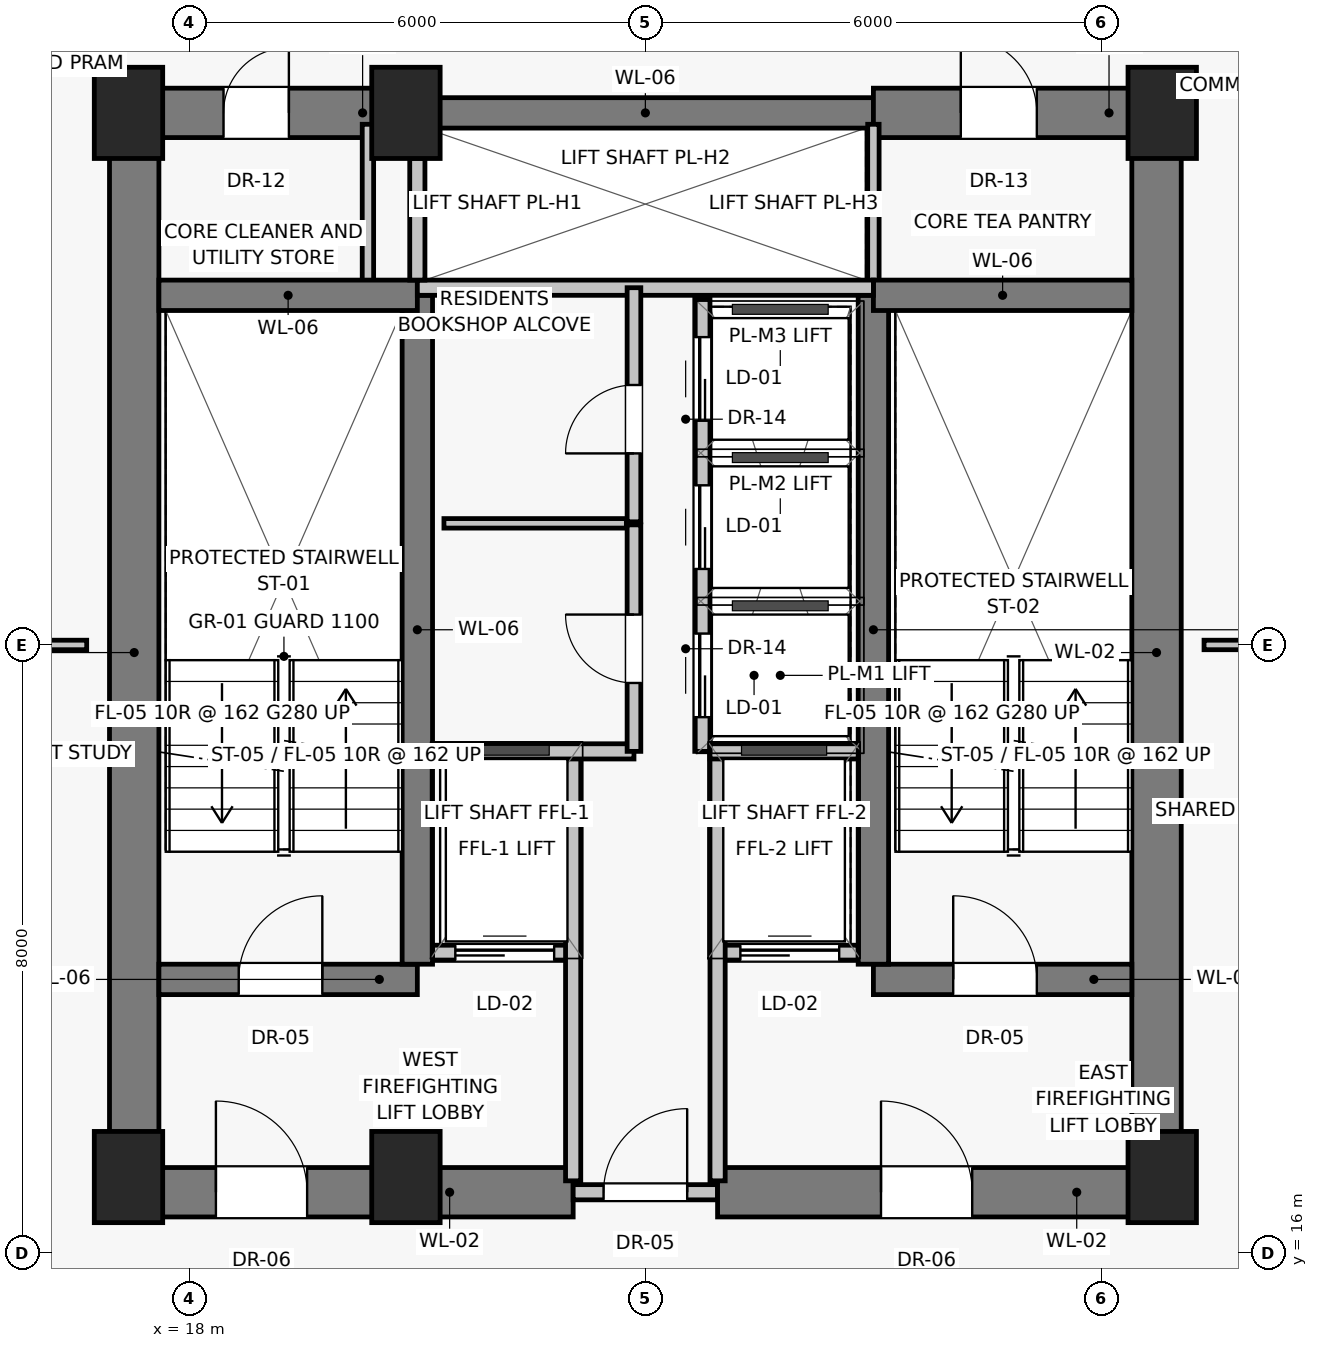
"""IFC4 building model, lengths in metres.
Left out: names, types, materials, properties, quantities, classifications, styles, units other than length and angle.
Written with IfcOpenShell. Run it as: python <this file> out.ifc"""

import sys

from ifc_helpers import new_model, si_unit, direction, frame, frame_2d, origin, origin_2d, place, context, subcontext, project, spatial, rectangle, extrude, source, transform, mapped, element, fill, save


model = new_model("IFC4")
c1 = context("Model", 3, precision=1e-05, world=origin(), true_north=direction((0.0, 1.0)))
c2 = subcontext(c1, "Body", "Model", "MODEL_VIEW")
j1 = project(units=[si_unit("LENGTHUNIT", "METRE"), si_unit("PLANEANGLEUNIT", "RADIAN")], contexts=[c1])
p1 = place(None, origin())
s1 = spatial("IfcSite", under=j1, at=p1, CompositionType="ELEMENT")
p2 = place(p1, origin())
s2 = spatial("IfcBuilding", under=s1, at=p2, CompositionType="ELEMENT")
p3 = place(p2, frame((0.0, 0.0, 142.5)))
s3 = spatial("IfcBuildingStorey", under=s2, at=p3, CompositionType="ELEMENT", Elevation=142.5)
for number, where, z_axis, x_axis in (
    (1, (17.2, 17.0, 0.0), (0.0, 0.0, 1.0), (1.0, 0.0, 0.0)),
    (2, (20.85, 17.0, 0.0), (0.0, 0.0, 1.0), (1.0, 0.0, 0.0)),
    (3, (30.8, 17.0, 0.0), (0.0, 0.0, 1.0), (1.0, 0.0, 0.0)),
    (4, (17.2, 31.0, 0.0), (0.0, 0.0, 1.0), (1.0, 0.0, 0.0)),
    (5, (20.85, 31.0, 0.0), (0.0, 0.0, 1.0), (1.0, 0.0, 0.0)),
    (6, (30.8, 31.0, 0.0), (0.0, 0.0, 1.0), (1.0, 0.0, 0.0)),
):
    element("IfcColumn", number, at=place(p3, frame(where, z_axis=z_axis, x_axis=x_axis)), inside=s3, PredefinedType="PILASTER", context=c2, shape_type="SweptSolid", body=[
        extrude(rectangle(XDim=0.9, YDim=1.2, at=origin_2d()), origin(), (0.0, 0.0, 1.0), 3.25),
    ])
for number, where, z_axis, x_axis in (
    (7, (17.275, 16.8, 0.0), (0.0, 0.0, 1.0), (0.0, 1.0, 0.0)),
    (8, (30.725, 16.8, 0.0), (0.0, 0.0, 1.0), (0.0, 1.0, 0.0)),
):
    element("IfcWall", number, at=place(p3, frame(where, z_axis=z_axis, x_axis=x_axis)), inside=s3, PredefinedType="SHEAR", context=c2, shape_type="SweptSolid", body=[
        extrude(rectangle(XDim=14.2, YDim=0.65, at=frame_2d((7.1, 0.0))), origin(), (0.0, 0.0, 1.0), 3.0),
    ])
p4 = place(p3, frame((17.2, 16.8, 0.0), z_axis=(0.0, 0.0, 1.0), x_axis=(1.0, 0.0, 0.0)))
e9 = element("IfcWall", 9, at=p4, inside=s3, PredefinedType="SHEAR", context=c2, shape_type="SweptSolid", body=[
    extrude(rectangle(XDim=5.85, YDim=0.65, at=frame_2d((2.925, 0.0))), origin(), (0.0, 0.0, 1.0), 3.0),
])
p5 = place(p4, frame((1.15, 0.0, 0.0)))
e10 = element("IfcOpeningElement", 10, at=p5, cuts=e9, PredefinedType="OPENING", context=c2, shape_type="SweptSolid", body=[
    extrude(rectangle(XDim=1.2, YDim=2.03, at=frame_2d((0.6, 1.015))), frame((0.0, 0.335, 0.0), z_axis=(0.0, -1.0, 0.0), x_axis=(1.0, 0.0, 0.0)), (0.0, 0.0, 1.0), 0.67),
])
p6 = place(p3, frame((23.05, 16.8, 0.0), z_axis=(0.0, 0.0, 1.0), x_axis=(1.0, 0.0, 0.0)))
e11 = element("IfcWall", 11, at=p6, inside=s3, PredefinedType="SOLIDWALL", context=c2, shape_type="SweptSolid", body=[
    extrude(rectangle(XDim=1.9, YDim=0.2, at=frame_2d((0.95, 0.0))), origin(), (0.0, 0.0, 1.0), 2.15),
])
p7 = place(p6, frame((0.4, 0.0, 0.0)))
e12 = element("IfcOpeningElement", 12, at=p7, cuts=e11, PredefinedType="OPENING", context=c2, shape_type="SweptSolid", body=[
    extrude(rectangle(XDim=1.1, YDim=2.03, at=frame_2d((0.55, 1.015))), frame((0.0, 0.11, 0.0), z_axis=(0.0, -1.0, 0.0), x_axis=(1.0, 0.0, 0.0)), (0.0, 0.0, 1.0), 0.22),
])
p8 = place(p3, frame((24.95, 16.8, 0.0), z_axis=(0.0, 0.0, 1.0), x_axis=(1.0, 0.0, 0.0)))
e13 = element("IfcWall", 13, at=p8, inside=s3, PredefinedType="SHEAR", context=c2, shape_type="SweptSolid", body=[
    extrude(rectangle(XDim=5.85, YDim=0.65, at=frame_2d((2.925, 0.0))), origin(), (0.0, 0.0, 1.0), 3.0),
])
p9 = place(p8, frame((2.15, 0.0, 0.0)))
e14 = element("IfcOpeningElement", 14, at=p9, cuts=e13, PredefinedType="OPENING", context=c2, shape_type="SweptSolid", body=[
    extrude(rectangle(XDim=1.2, YDim=2.03, at=frame_2d((0.6, 1.015))), frame((0.0, 0.335, 0.0), z_axis=(0.0, -1.0, 0.0), x_axis=(1.0, 0.0, 0.0)), (0.0, 0.0, 1.0), 0.67),
])
p10 = place(p3, frame((17.2, 31.0, 0.0), z_axis=(0.0, 0.0, 1.0), x_axis=(1.0, 0.0, 0.0)))
e15 = element("IfcWall", 15, at=p10, inside=s3, PredefinedType="SHEAR", context=c2, shape_type="SweptSolid", body=[
    extrude(rectangle(XDim=3.8, YDim=0.65, at=frame_2d((1.9, 0.0))), origin(), (0.0, 0.0, 1.0), 3.0),
])
p11 = place(p10, frame((1.25, 0.0, 0.0)))
e16 = element("IfcOpeningElement", 16, at=p11, cuts=e15, PredefinedType="OPENING", context=c2, shape_type="SweptSolid", body=[
    extrude(rectangle(XDim=0.86, YDim=2.01, at=frame_2d((0.43, 1.005))), frame((0.0, 0.335, 0.0), z_axis=(0.0, -1.0, 0.0), x_axis=(1.0, 0.0, 0.0)), (0.0, 0.0, 1.0), 0.67),
])
p12 = place(p3, frame((21.0, 31.0, 0.0), z_axis=(0.0, 0.0, 1.0), x_axis=(1.0, 0.0, 0.0)))
e17 = element("IfcWall", 17, at=p12, inside=s3, PredefinedType="SHEAR", context=c2, shape_type="SweptSolid", body=[
    extrude(rectangle(XDim=6.0, YDim=0.4, at=frame_2d((3.0, 0.0))), origin(), (0.0, 0.0, 1.0), 3.0),
])
p13 = place(p3, frame((27.0, 31.0, 0.0), z_axis=(0.0, 0.0, 1.0), x_axis=(1.0, 0.0, 0.0)))
e18 = element("IfcWall", 18, at=p13, inside=s3, PredefinedType="SHEAR", context=c2, shape_type="SweptSolid", body=[
    extrude(rectangle(XDim=3.8, YDim=0.65, at=frame_2d((1.9, 0.0))), origin(), (0.0, 0.0, 1.0), 3.0),
])
p14 = place(p13, frame((1.15, 0.0, 0.0)))
e19 = element("IfcOpeningElement", 19, at=p14, cuts=e18, PredefinedType="OPENING", context=c2, shape_type="SweptSolid", body=[
    extrude(rectangle(XDim=1.0, YDim=2.01, at=frame_2d((0.5, 1.005))), frame((0.0, 0.335, 0.0), z_axis=(0.0, -1.0, 0.0), x_axis=(1.0, 0.0, 0.0)), (0.0, 0.0, 1.0), 0.67),
])
for number, where, z_axis, x_axis in (
    (20, (20.35, 28.65, 0.0), (0.0, 0.0, 1.0), (0.0, 1.0, 0.0)),
    (21, (27.0, 28.65, 0.0), (0.0, 0.0, 1.0), (0.0, 1.0, 0.0)),
):
    element("IfcWall", number, at=place(p3, frame(where, z_axis=z_axis, x_axis=x_axis)), inside=s3, PredefinedType="PARTITIONING", context=c2, shape_type="SweptSolid", body=[
        extrude(rectangle(XDim=2.2, YDim=0.15, at=frame_2d((1.1, 0.0))), origin(), (0.0, 0.0, 1.0), 3.0),
    ])
p15 = place(p3, frame((17.6, 19.6, 0.0), z_axis=(0.0, 0.0, 1.0), x_axis=(1.0, 0.0, 0.0)))
e22 = element("IfcWall", 22, at=p15, inside=s3, PredefinedType="SHEAR", context=c2, shape_type="SweptSolid", body=[
    extrude(rectangle(XDim=3.4, YDim=0.4, at=frame_2d((1.7, 0.0))), origin(), (0.0, 0.0, 1.0), 3.0),
])
p16 = place(p15, frame((1.05, 0.0, 0.0)))
e23 = element("IfcOpeningElement", 23, at=p16, cuts=e22, PredefinedType="OPENING", context=c2, shape_type="SweptSolid", body=[
    extrude(rectangle(XDim=1.1, YDim=2.03, at=frame_2d((0.55, 1.015))), frame((0.0, 0.21, 0.0), z_axis=(0.0, -1.0, 0.0), x_axis=(1.0, 0.0, 0.0)), (0.0, 0.0, 1.0), 0.42),
])
p17 = place(p3, frame((21.2, 19.95, 0.0), z_axis=(0.0, 0.0, 1.0), x_axis=(1.0, 0.0, 0.0)))
e24 = element("IfcWall", 24, at=p17, inside=s3, PredefinedType="SOLIDWALL", context=c2, shape_type="SweptSolid", body=[
    extrude(rectangle(XDim=1.85, YDim=0.2, at=frame_2d((0.925, 0.0))), origin(), (0.0, 0.0, 1.0), 3.0),
])
p18 = place(p17, frame((0.3, 0.0, 0.0)))
e25 = element("IfcOpeningElement", 25, at=p18, cuts=e24, PredefinedType="OPENING", context=c2, shape_type="SweptSolid", body=[
    extrude(rectangle(XDim=1.3, YDim=2.25, at=frame_2d((0.65, 1.125))), frame((0.0, 0.11, 0.0), z_axis=(0.0, -1.0, 0.0), x_axis=(1.0, 0.0, 0.0)), (0.0, 0.0, 1.0), 0.22),
])
p19 = place(p3, frame((24.95, 19.95, 0.0), z_axis=(0.0, 0.0, 1.0), x_axis=(1.0, 0.0, 0.0)))
e26 = element("IfcWall", 26, at=p19, inside=s3, PredefinedType="SOLIDWALL", context=c2, shape_type="SweptSolid", body=[
    extrude(rectangle(XDim=1.85, YDim=0.2, at=frame_2d((0.925, 0.0))), origin(), (0.0, 0.0, 1.0), 3.0),
])
p20 = place(p19, frame((0.3, 0.0, 0.0)))
e27 = element("IfcOpeningElement", 27, at=p20, cuts=e26, PredefinedType="OPENING", context=c2, shape_type="SweptSolid", body=[
    extrude(rectangle(XDim=1.3, YDim=2.25, at=frame_2d((0.65, 1.125))), frame((0.0, 0.11, 0.0), z_axis=(0.0, -1.0, 0.0), x_axis=(1.0, 0.0, 0.0)), (0.0, 0.0, 1.0), 0.22),
])
p21 = place(p3, frame((27.0, 19.6, 0.0), z_axis=(0.0, 0.0, 1.0), x_axis=(1.0, 0.0, 0.0)))
e28 = element("IfcWall", 28, at=p21, inside=s3, PredefinedType="SHEAR", context=c2, shape_type="SweptSolid", body=[
    extrude(rectangle(XDim=3.4, YDim=0.4, at=frame_2d((1.7, 0.0))), origin(), (0.0, 0.0, 1.0), 3.0),
])
p22 = place(p21, frame((1.05, 0.0, 0.0)))
e29 = element("IfcOpeningElement", 29, at=p22, cuts=e28, PredefinedType="OPENING", context=c2, shape_type="SweptSolid", body=[
    extrude(rectangle(XDim=1.1, YDim=2.03, at=frame_2d((0.55, 1.015))), frame((0.0, 0.21, 0.0), z_axis=(0.0, -1.0, 0.0), x_axis=(1.0, 0.0, 0.0)), (0.0, 0.0, 1.0), 0.42),
])
for number, where, z_axis, x_axis in (
    (30, (21.0, 19.8, 0.0), (0.0, 0.0, 1.0), (0.0, 1.0, 0.0)),
    (31, (27.0, 19.8, 0.0), (0.0, 0.0, 1.0), (0.0, 1.0, 0.0)),
):
    element("IfcWall", number, at=place(p3, frame(where, z_axis=z_axis, x_axis=x_axis)), inside=s3, PredefinedType="SHEAR", context=c2, shape_type="SweptSolid", body=[
        extrude(rectangle(XDim=8.8, YDim=0.4, at=frame_2d((4.4, 0.0))), origin(), (0.0, 0.0, 1.0), 3.0),
    ])
for number, where, z_axis, x_axis in (
    (32, (17.6, 28.6, 0.0), (0.0, 0.0, 1.0), (1.0, 0.0, 0.0)),
    (33, (27.0, 28.6, 0.0), (0.0, 0.0, 1.0), (1.0, 0.0, 0.0)),
):
    element("IfcWall", number, at=place(p3, frame(where, z_axis=z_axis, x_axis=x_axis)), inside=s3, PredefinedType="SHEAR", context=c2, shape_type="SweptSolid", body=[
        extrude(rectangle(XDim=3.4, YDim=0.4, at=frame_2d((1.7, 0.0))), origin(), (0.0, 0.0, 1.0), 3.0),
    ])
for number, where, z_axis, x_axis in (
    (34, (23.05, 16.95, 0.0), (0.0, 0.0, 1.0), (0.0, 1.0, 0.0)),
    (35, (24.95, 16.95, 0.0), (0.0, 0.0, 1.0), (0.0, 1.0, 0.0)),
):
    element("IfcWall", number, at=place(p3, frame(where, z_axis=z_axis, x_axis=x_axis)), inside=s3, PredefinedType="SOLIDWALL", context=c2, shape_type="SweptSolid", body=[
        extrude(rectangle(XDim=5.6, YDim=0.2, at=frame_2d((2.8, 0.0))), origin(), (0.0, 0.0, 1.0), 3.0),
    ])
p23 = place(p3, frame((21.2, 22.6, 0.0), z_axis=(0.0, 0.0, 1.0), x_axis=(1.0, 0.0, 0.0)))
e36 = element("IfcWall", 36, at=p23, inside=s3, PredefinedType="SOLIDWALL", context=c2, shape_type="SweptSolid", body=[
    extrude(rectangle(XDim=2.65, YDim=0.2, at=frame_2d((1.325, 0.0))), origin(), (0.0, 0.0, 1.0), 3.0),
])
p24 = place(p3, frame((24.85, 22.6, 0.0), z_axis=(0.0, 0.0, 1.0), x_axis=(1.0, 0.0, 0.0)))
e37 = element("IfcWall", 37, at=p24, inside=s3, PredefinedType="SOLIDWALL", context=c2, shape_type="SweptSolid", body=[
    extrude(rectangle(XDim=1.95, YDim=0.2, at=frame_2d((0.975, 0.0))), origin(), (0.0, 0.0, 1.0), 3.0),
])
p25 = place(p3, frame((21.0, 28.7, 0.0), z_axis=(0.0, 0.0, 1.0), x_axis=(1.0, 0.0, 0.0)))
e38 = element("IfcWall", 38, at=p25, inside=s3, PredefinedType="SOLIDWALL", context=c2, shape_type="SweptSolid", body=[
    extrude(rectangle(XDim=6.0, YDim=0.2, at=frame_2d((3.0, 0.0))), origin(), (0.0, 0.0, 1.0), 3.0),
])
p26 = place(p3, frame((21.0, 28.8, 0.0), z_axis=(0.0, 0.0, 1.0), x_axis=(0.0, 1.0, 0.0)))
e39 = element("IfcWall", 39, at=p26, inside=s3, PredefinedType="SOLIDWALL", context=c2, shape_type="SweptSolid", body=[
    extrude(rectangle(XDim=1.6, YDim=0.2, at=frame_2d((0.8, 0.0))), origin(), (0.0, 0.0, 1.0), 3.0),
])
p27 = place(p3, frame((23.85, 22.6, 0.0), z_axis=(0.0, 0.0, 1.0), x_axis=(0.0, 1.0, 0.0)))
e40 = element("IfcWall", 40, at=p27, inside=s3, PredefinedType="PARTITIONING", context=c2, shape_type="SweptSolid", body=[
    extrude(rectangle(XDim=2.98, YDim=0.18, at=frame_2d((1.49, 0.0))), origin(), (0.0, 0.0, 1.0), 3.0),
])
p28 = place(p27, frame((0.9, 0.0, 0.0)))
e41 = element("IfcOpeningElement", 41, at=p28, cuts=e40, PredefinedType="OPENING", context=c2, shape_type="SweptSolid", body=[
    extrude(rectangle(XDim=0.9, YDim=2.01, at=frame_2d((0.45, 1.005))), frame((0.0, 0.1, 0.0), z_axis=(0.0, -1.0, 0.0), x_axis=(1.0, 0.0, 0.0)), (0.0, 0.0, 1.0), 0.2),
])
p29 = place(p3, frame((23.85, 25.62, 0.0), z_axis=(0.0, 0.0, 1.0), x_axis=(0.0, 1.0, 0.0)))
e42 = element("IfcWall", 42, at=p29, inside=s3, PredefinedType="PARTITIONING", context=c2, shape_type="SweptSolid", body=[
    extrude(rectangle(XDim=3.08, YDim=0.18, at=frame_2d((1.54, 0.0))), origin(), (0.0, 0.0, 1.0), 3.0),
])
p30 = place(p29, frame((0.9, 0.0, 0.0)))
e43 = element("IfcOpeningElement", 43, at=p30, cuts=e42, PredefinedType="OPENING", context=c2, shape_type="SweptSolid", body=[
    extrude(rectangle(XDim=0.9, YDim=2.01, at=frame_2d((0.45, 1.005))), frame((0.0, 0.1, 0.0), z_axis=(0.0, -1.0, 0.0), x_axis=(1.0, 0.0, 0.0)), (0.0, 0.0, 1.0), 0.2),
])
p31 = place(p3, frame((24.75, 22.6, 0.0), z_axis=(0.0, 0.0, 1.0), x_axis=(0.0, 1.0, 0.0)))
e44 = element("IfcWall", 44, at=p31, inside=s3, PredefinedType="SOLIDWALL", context=c2, shape_type="SweptSolid", body=[
    extrude(rectangle(XDim=5.95, YDim=0.2, at=frame_2d((2.975, 0.0))), origin(), (0.0, 0.0, 1.0), 3.0),
])
p32 = place(p31, frame((0.45, 0.0, 0.0)))
e45 = element("IfcOpeningElement", 45, at=p32, cuts=e44, PredefinedType="OPENING", context=c2, shape_type="SweptSolid", body=[
    extrude(rectangle(XDim=1.1, YDim=2.08, at=frame_2d((0.55, 1.04))), frame((0.0, 0.11, 0.0), z_axis=(0.0, -1.0, 0.0), x_axis=(1.0, 0.0, 0.0)), (0.0, 0.0, 1.0), 0.22),
])
p33 = place(p31, frame((2.4, 0.0, 0.0)))
e46 = element("IfcOpeningElement", 46, at=p33, cuts=e44, PredefinedType="OPENING", context=c2, shape_type="SweptSolid", body=[
    extrude(rectangle(XDim=1.1, YDim=2.08, at=frame_2d((0.55, 1.04))), frame((0.0, 0.11, 0.0), z_axis=(0.0, -1.0, 0.0), x_axis=(1.0, 0.0, 0.0)), (0.0, 0.0, 1.0), 0.22),
])
p34 = place(p31, frame((4.35, 0.0, 0.0)))
e47 = element("IfcOpeningElement", 47, at=p34, cuts=e44, PredefinedType="OPENING", context=c2, shape_type="SweptSolid", body=[
    extrude(rectangle(XDim=1.1, YDim=2.08, at=frame_2d((0.55, 1.04))), frame((0.0, 0.11, 0.0), z_axis=(0.0, -1.0, 0.0), x_axis=(1.0, 0.0, 0.0)), (0.0, 0.0, 1.0), 0.22),
])
p35 = place(p3, frame((21.35, 25.6, 0.0), z_axis=(0.0, 0.0, 1.0), x_axis=(1.0, 0.0, 0.0)))
e48 = element("IfcWall", 48, at=p35, inside=s3, PredefinedType="PARTITIONING", context=c2, shape_type="SweptSolid", body=[
    extrude(rectangle(XDim=2.4, YDim=0.125, at=frame_2d((1.2, 0.0))), origin(), (0.0, 0.0, 1.0), 3.0),
])
for number, where, z_axis, x_axis in (
    (49, (14.55, 24.0, 0.0), (0.0, 0.0, 1.0), (1.0, 0.0, 0.0)),
    (50, (31.35, 24.0, 0.0), (0.0, 0.0, 1.0), (1.0, 0.0, 0.0)),
):
    element("IfcWall", number, at=place(p3, frame(where, z_axis=z_axis, x_axis=x_axis)), inside=s3, PredefinedType="PARTITIONING", context=c2, shape_type="SweptSolid", body=[
        extrude(rectangle(XDim=2.1, YDim=0.125, at=frame_2d((1.05, 0.0))), origin(), (0.0, 0.0, 1.0), 3.0),
    ])
m1 = source(origin(), c2, "Body", "SweptSolid", [
    extrude(rectangle(XDim=1.2, YDim=2.03, at=frame_2d((0.6, 1.015))), frame((0.0, 0.025, 0.0), z_axis=(0.0, -1.0, 0.0), x_axis=(1.0, 0.0, 0.0)), (0.0, 0.0, 1.0), 0.05),
])
p36 = place(p5, origin())
e51 = element("IfcDoor", 51, at=p36, inside=s3, OperationType="SINGLE_SWING_LEFT", PredefinedType="DOOR", context=c2, shape_type="MappedRepresentation", body=[
    mapped(m1, transform((0.0, 0.0, 0.0), scale=1.0)),
])
fill(e10, e51)
m2 = source(origin(), c2, "Body", "SweptSolid", [
    extrude(rectangle(XDim=1.1, YDim=2.03, at=frame_2d((0.55, 1.015))), frame((0.0, 0.025, 0.0), z_axis=(0.0, -1.0, 0.0), x_axis=(1.0, 0.0, 0.0)), (0.0, 0.0, 1.0), 0.05),
])
p37 = place(p7, origin())
e52 = element("IfcDoor", 52, at=p37, inside=s3, OperationType="SINGLE_SWING_RIGHT", PredefinedType="DOOR", context=c2, shape_type="MappedRepresentation", body=[
    mapped(m2, transform((0.0, 0.0, 0.0), scale=1.0)),
])
fill(e12, e52)
p38 = place(p9, origin())
e53 = element("IfcDoor", 53, at=p38, inside=s3, OperationType="SINGLE_SWING_LEFT", PredefinedType="DOOR", context=c2, shape_type="MappedRepresentation", body=[
    mapped(m1, transform((0.0, 0.0, 0.0), scale=1.0)),
])
fill(e14, e53)
m3 = source(origin(), c2, "Body", "SweptSolid", [
    extrude(rectangle(XDim=0.86, YDim=2.01, at=frame_2d((0.43, 1.005))), frame((0.0, 0.025, 0.0), z_axis=(0.0, -1.0, 0.0), x_axis=(1.0, 0.0, 0.0)), (0.0, 0.0, 1.0), 0.05),
])
p39 = place(p11, origin())
e54 = element("IfcDoor", 54, at=p39, inside=s3, OperationType="SINGLE_SWING_RIGHT", PredefinedType="DOOR", context=c2, shape_type="MappedRepresentation", body=[
    mapped(m3, transform((0.0, 0.0, 0.0), scale=1.0)),
])
fill(e16, e54)
m4 = source(origin(), c2, "Body", "SweptSolid", [
    extrude(rectangle(XDim=1.0, YDim=2.01, at=frame_2d((0.5, 1.005))), frame((0.0, 0.025, 0.0), z_axis=(0.0, -1.0, 0.0), x_axis=(1.0, 0.0, 0.0)), (0.0, 0.0, 1.0), 0.05),
])
p40 = place(p14, origin())
e55 = element("IfcDoor", 55, at=p40, inside=s3, OperationType="SINGLE_SWING_LEFT", PredefinedType="DOOR", context=c2, shape_type="MappedRepresentation", body=[
    mapped(m4, transform((0.0, 0.0, 0.0), scale=1.0)),
])
fill(e19, e55)
p41 = place(p16, origin())
e56 = element("IfcDoor", 56, at=p41, inside=s3, OperationType="SINGLE_SWING_RIGHT", PredefinedType="DOOR", context=c2, shape_type="MappedRepresentation", body=[
    mapped(m2, transform((0.0, 0.0, 0.0), scale=1.0)),
])
fill(e23, e56)
m5 = source(origin(), c2, "Body", "SweptSolid", [
    extrude(rectangle(XDim=1.3, YDim=2.25, at=frame_2d((0.65, 1.125))), frame((0.0, 0.025, 0.0), z_axis=(0.0, -1.0, 0.0), x_axis=(1.0, 0.0, 0.0)), (0.0, 0.0, 1.0), 0.05),
])
p42 = place(p18, origin())
e57 = element("IfcDoor", 57, at=p42, inside=s3, OperationType="SLIDING_TO_LEFT", PredefinedType="DOOR", context=c2, shape_type="MappedRepresentation", body=[
    mapped(m5, transform((0.0, 0.0, 0.0), scale=1.0)),
])
fill(e25, e57)
p43 = place(p20, origin())
e58 = element("IfcDoor", 58, at=p43, inside=s3, OperationType="SLIDING_TO_LEFT", PredefinedType="DOOR", context=c2, shape_type="MappedRepresentation", body=[
    mapped(m5, transform((0.0, 0.0, 0.0), scale=1.0)),
])
fill(e27, e58)
p44 = place(p22, origin())
e59 = element("IfcDoor", 59, at=p44, inside=s3, OperationType="SINGLE_SWING_LEFT", PredefinedType="DOOR", context=c2, shape_type="MappedRepresentation", body=[
    mapped(m2, transform((0.0, 0.0, 0.0), scale=1.0)),
])
fill(e29, e59)
m6 = source(origin(), c2, "Body", "SweptSolid", [
    extrude(rectangle(XDim=0.9, YDim=2.01, at=frame_2d((0.45, 1.005))), frame((0.0, 0.025, 0.0), z_axis=(0.0, -1.0, 0.0), x_axis=(1.0, 0.0, 0.0)), (0.0, 0.0, 1.0), 0.05),
])
p45 = place(p28, origin())
e60 = element("IfcDoor", 60, at=p45, inside=s3, OperationType="SINGLE_SWING_RIGHT", PredefinedType="DOOR", context=c2, shape_type="MappedRepresentation", body=[
    mapped(m6, transform((0.0, 0.0, 0.0), scale=1.0)),
])
fill(e41, e60)
p46 = place(p30, origin())
e61 = element("IfcDoor", 61, at=p46, inside=s3, OperationType="SINGLE_SWING_LEFT", PredefinedType="DOOR", context=c2, shape_type="MappedRepresentation", body=[
    mapped(m6, transform((0.0, 0.0, 0.0), scale=1.0)),
])
fill(e43, e61)
m7 = source(origin(), c2, "Body", "SweptSolid", [
    extrude(rectangle(XDim=1.1, YDim=2.08, at=frame_2d((0.55, 1.04))), frame((0.0, 0.025, 0.0), z_axis=(0.0, -1.0, 0.0), x_axis=(1.0, 0.0, 0.0)), (0.0, 0.0, 1.0), 0.05),
])
p47 = place(p32, origin())
e62 = element("IfcDoor", 62, at=p47, inside=s3, OperationType="SLIDING_TO_LEFT", PredefinedType="DOOR", context=c2, shape_type="MappedRepresentation", body=[
    mapped(m7, transform((0.0, 0.0, 0.0), scale=1.0)),
])
fill(e45, e62)
p48 = place(p33, origin())
e63 = element("IfcDoor", 63, at=p48, inside=s3, OperationType="SLIDING_TO_LEFT", PredefinedType="DOOR", context=c2, shape_type="MappedRepresentation", body=[
    mapped(m7, transform((0.0, 0.0, 0.0), scale=1.0)),
])
fill(e46, e63)
p49 = place(p34, origin())
e64 = element("IfcDoor", 64, at=p49, inside=s3, OperationType="SLIDING_TO_LEFT", PredefinedType="DOOR", context=c2, shape_type="MappedRepresentation", body=[
    mapped(m7, transform((0.0, 0.0, 0.0), scale=1.0)),
])
fill(e47, e64)
save(model, sys.argv[1])
